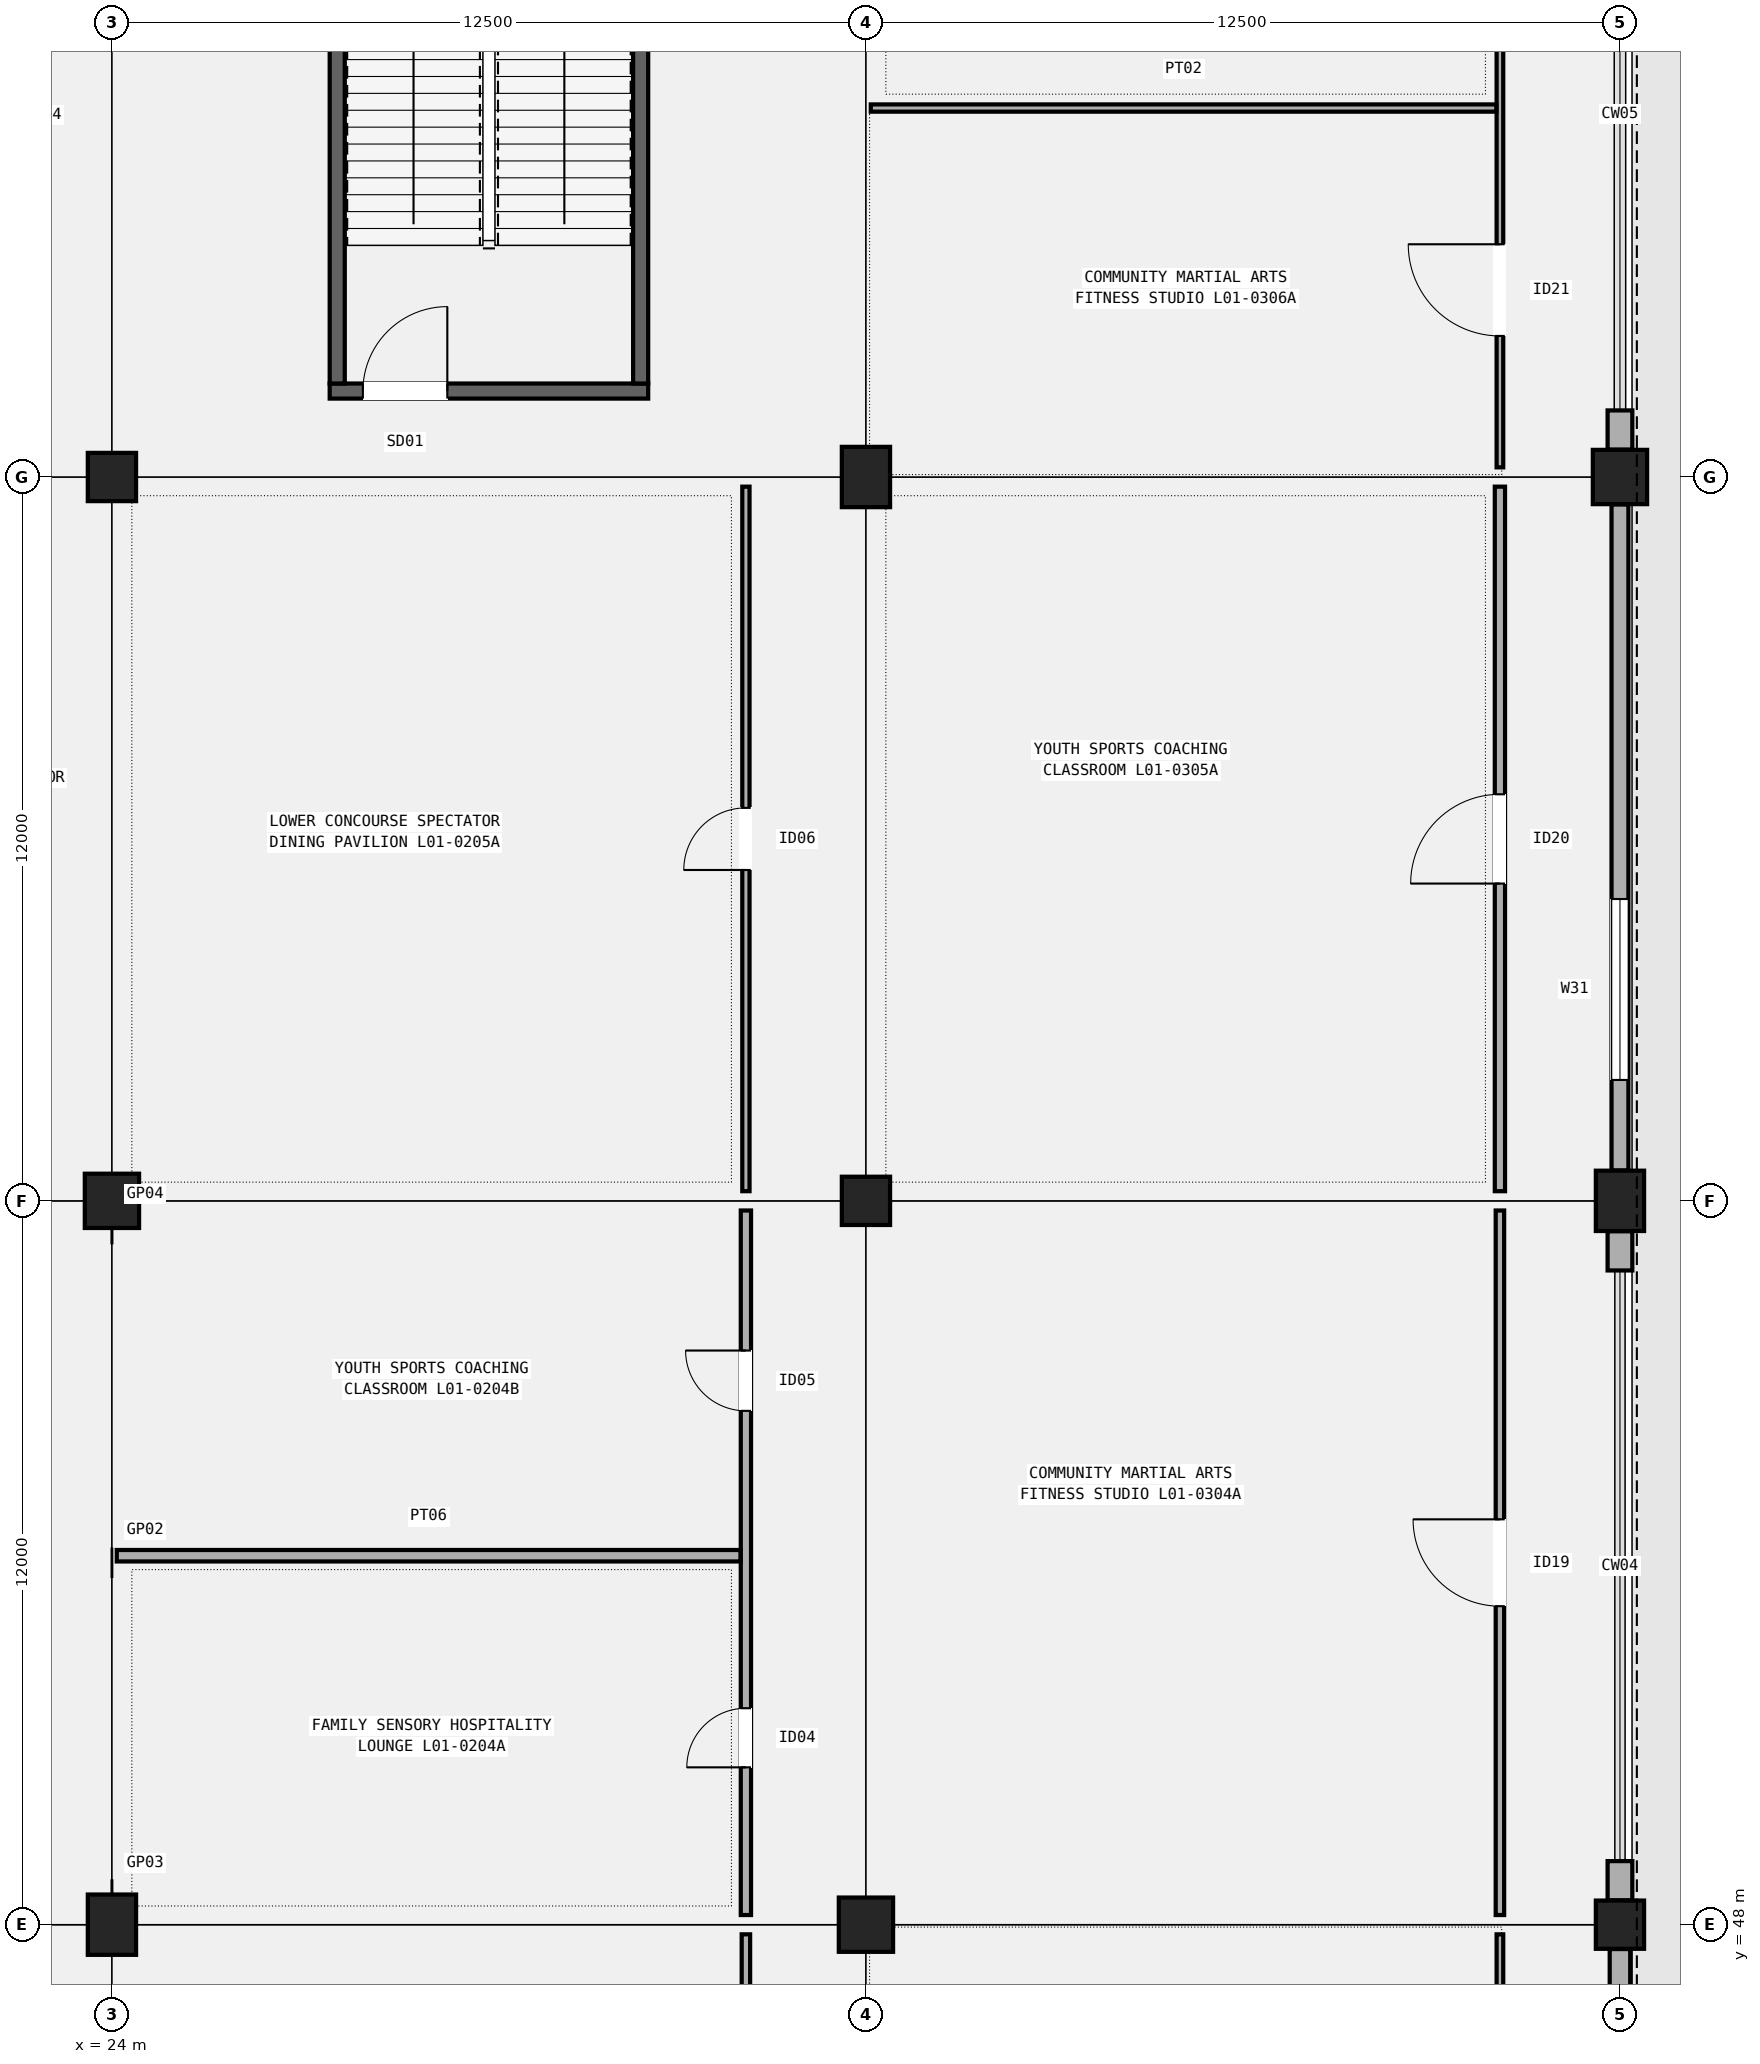
"""IFC4 building model, lengths in metres.
Left out: names, types, materials, properties, quantities, classifications, styles, units other than length and angle.
Written with IfcOpenShell. Run it as: python <this file> out.ifc"""

import sys

from ifc_helpers import new_model, si_unit, direction, frame, frame_2d, origin, origin_2d, place, context, subcontext, project, spatial, rectangle, extrude, element, fill, save


model = new_model("IFC4")
c1 = context("Model", 3, precision=1e-05, world=origin(), true_north=direction((0.0, 1.0)))
c2 = subcontext(c1, "Body", "Model", "MODEL_VIEW")
j1 = project(units=[si_unit("LENGTHUNIT", "METRE"), si_unit("PLANEANGLEUNIT", "RADIAN")], contexts=[c1])
p1 = place(None, origin())
s1 = spatial("IfcSite", under=j1, at=p1, CompositionType="ELEMENT")
p2 = place(p1, origin())
s2 = spatial("IfcBuilding", under=s1, at=p2, CompositionType="ELEMENT")
p3 = place(p2, frame((0.0, 0.0, 5.4)))
s3 = spatial("IfcBuildingStorey", under=s2, at=p3, CompositionType="ELEMENT", Elevation=5.4)
p4 = place(p3, frame((24.0, 48.0, 0.0), z_axis=(0.0, 0.0, 1.0), x_axis=(1.0, 0.0, 0.0)))
e1 = element("IfcColumn", 1, at=p4, inside=s3, PredefinedType="COLUMN", context=c2, shape_type="SweptSolid", body=[
    extrude(rectangle(XDim=0.8, YDim=1.0, at=origin_2d()), origin(), (0.0, 0.0, 1.0), 4.8),
])
p5 = place(p3, frame((24.0, 60.0, 0.0), z_axis=(0.0, 0.0, 1.0), x_axis=(1.0, 0.0, 0.0)))
e2 = element("IfcColumn", 2, at=p5, inside=s3, PredefinedType="COLUMN", context=c2, shape_type="SweptSolid", body=[
    extrude(rectangle(XDim=0.9, YDim=0.9, at=origin_2d()), origin(), (0.0, 0.0, 1.0), 4.8),
])
p6 = place(p3, frame((24.0, 72.0, 0.0), z_axis=(0.0, 0.0, 1.0), x_axis=(1.0, 0.0, 0.0)))
e3 = element("IfcColumn", 3, at=p6, inside=s3, PredefinedType="COLUMN", context=c2, shape_type="SweptSolid", body=[
    extrude(rectangle(XDim=0.8, YDim=0.8, at=origin_2d()), origin(), (0.0, 0.0, 1.0), 4.8),
])
p7 = place(p3, frame((36.5, 48.0, 0.0), z_axis=(0.0, 0.0, 1.0), x_axis=(1.0, 0.0, 0.0)))
e4 = element("IfcColumn", 4, at=p7, inside=s3, PredefinedType="COLUMN", context=c2, shape_type="SweptSolid", body=[
    extrude(rectangle(XDim=0.9, YDim=0.9, at=origin_2d()), origin(), (0.0, 0.0, 1.0), 4.8),
])
p8 = place(p3, frame((36.5, 60.0, 0.0), z_axis=(0.0, 0.0, 1.0), x_axis=(1.0, 0.0, 0.0)))
e5 = element("IfcColumn", 5, at=p8, inside=s3, PredefinedType="COLUMN", context=c2, shape_type="SweptSolid", body=[
    extrude(rectangle(XDim=0.8, YDim=0.8, at=origin_2d()), origin(), (0.0, 0.0, 1.0), 4.8),
])
p9 = place(p3, frame((36.5, 72.0, 0.0), z_axis=(0.0, 0.0, 1.0), x_axis=(1.0, 0.0, 0.0)))
e6 = element("IfcColumn", 6, at=p9, inside=s3, PredefinedType="COLUMN", context=c2, shape_type="SweptSolid", body=[
    extrude(rectangle(XDim=0.8, YDim=1.0, at=origin_2d()), origin(), (0.0, 0.0, 1.0), 4.8),
])
p10 = place(p3, frame((49.0, 48.0, 0.0), z_axis=(0.0, 0.0, 1.0), x_axis=(1.0, 0.0, 0.0)))
e7 = element("IfcColumn", 7, at=p10, inside=s3, PredefinedType="COLUMN", context=c2, shape_type="SweptSolid", body=[
    extrude(rectangle(XDim=0.8, YDim=0.8, at=origin_2d()), origin(), (0.0, 0.0, 1.0), 4.8),
])
p11 = place(p3, frame((49.0, 60.0, 0.0), z_axis=(0.0, 0.0, 1.0), x_axis=(1.0, 0.0, 0.0)))
e8 = element("IfcColumn", 8, at=p11, inside=s3, PredefinedType="COLUMN", context=c2, shape_type="SweptSolid", body=[
    extrude(rectangle(XDim=0.8, YDim=1.0, at=origin_2d()), origin(), (0.0, 0.0, 1.0), 4.8),
])
p12 = place(p3, frame((49.0, 72.0, 0.0), z_axis=(0.0, 0.0, 1.0), x_axis=(1.0, 0.0, 0.0)))
e9 = element("IfcColumn", 9, at=p12, inside=s3, PredefinedType="COLUMN", context=c2, shape_type="SweptSolid", body=[
    extrude(rectangle(XDim=0.9, YDim=0.9, at=origin_2d()), origin(), (0.0, 0.0, 1.0), 4.8),
])
p13 = place(p3, frame((49.0, 36.454, 0.0), z_axis=(0.0, 0.0, 1.0), x_axis=(0.0, 1.0, 0.0)))
e10 = element("IfcWall", 10, at=p13, inside=s3, PredefinedType="SOLIDWALL", context=c2, shape_type="SweptSolid", body=[
    extrude(rectangle(XDim=11.142, YDim=0.34, at=frame_2d((5.571, 0.0))), origin(), (0.0, 0.0, 1.0), 4.2),
])
p14 = place(p13, frame((1.5, 0.0, 0.95)))
e11 = element("IfcOpeningElement", 11, at=p14, cuts=e10, PredefinedType="OPENING", context=c2, shape_type="SweptSolid", body=[
    extrude(rectangle(XDim=3.0, YDim=1.7, at=frame_2d((1.5, 0.85))), frame((0.0, 0.18, 0.0), z_axis=(0.0, -1.0, 0.0), x_axis=(1.0, 0.0, 0.0)), (0.0, 0.0, 1.0), 0.36),
])
p15 = place(p3, frame((49.0, 48.404, 0.0), z_axis=(0.0, 0.0, 1.0), x_axis=(0.0, 1.0, 0.0)))
e12 = element("IfcWall", 12, at=p15, inside=s3, PredefinedType="SOLIDWALL", context=c2, shape_type="SweptSolid", body=[
    extrude(rectangle(XDim=0.65, YDim=0.41, at=frame_2d((0.325, 0.0))), origin(), (0.0, 0.0, 1.0), 4.15),
])
p16 = place(p3, frame((49.0, 58.846, 0.0), z_axis=(0.0, 0.0, 1.0), x_axis=(0.0, 1.0, 0.0)))
e13 = element("IfcWall", 13, at=p16, inside=s3, PredefinedType="SOLIDWALL", context=c2, shape_type="SweptSolid", body=[
    extrude(rectangle(XDim=0.65, YDim=0.41, at=frame_2d((0.325, 0.0))), origin(), (0.0, 0.0, 1.0), 4.15),
])
p17 = place(p3, frame((49.0, 60.504, 0.0), z_axis=(0.0, 0.0, 1.0), x_axis=(0.0, 1.0, 0.0)))
e14 = element("IfcWall", 14, at=p17, inside=s3, PredefinedType="SOLIDWALL", context=c2, shape_type="SweptSolid", body=[
    extrude(rectangle(XDim=11.042, YDim=0.28, at=frame_2d((5.521, 0.0))), origin(), (0.0, 0.0, 1.0), 4.2),
])
p18 = place(p17, frame((1.5, 0.0, 0.95)))
e15 = element("IfcOpeningElement", 15, at=p18, cuts=e14, PredefinedType="OPENING", context=c2, shape_type="SweptSolid", body=[
    extrude(rectangle(XDim=3.0, YDim=2.15, at=frame_2d((1.5, 1.075))), frame((0.0, 0.15, 0.0), z_axis=(0.0, -1.0, 0.0), x_axis=(1.0, 0.0, 0.0)), (0.0, 0.0, 1.0), 0.3),
])
p19 = place(p3, frame((49.0, 72.454, 0.0), z_axis=(0.0, 0.0, 1.0), x_axis=(0.0, 1.0, 0.0)))
e16 = element("IfcWall", 16, at=p19, inside=s3, PredefinedType="SOLIDWALL", context=c2, shape_type="SweptSolid", body=[
    extrude(rectangle(XDim=0.65, YDim=0.41, at=frame_2d((0.325, 0.0))), origin(), (0.0, 0.0, 1.0), 4.15),
])
p20 = place(p3, frame((27.61, 73.425, 0.0), z_axis=(0.0, 0.0, 1.0), x_axis=(1.0, 0.0, 0.0)))
e17 = element("IfcWall", 17, at=p20, inside=s3, PredefinedType="SHEAR", context=c2, shape_type="SweptSolid", body=[
    extrude(rectangle(XDim=5.28, YDim=0.25, at=frame_2d((2.64, 0.0))), origin(), (0.0, 0.0, 1.0), 4.55),
])
p21 = place(p20, frame((0.55, 0.0, 0.0)))
e18 = element("IfcOpeningElement", 18, at=p21, cuts=e17, PredefinedType="OPENING", context=c2, shape_type="SweptSolid", body=[
    extrude(rectangle(XDim=1.4, YDim=2.15, at=frame_2d((0.7, 1.075))), frame((0.0, 0.135, 0.0), z_axis=(0.0, -1.0, 0.0), x_axis=(1.0, 0.0, 0.0)), (0.0, 0.0, 1.0), 0.27),
])
for number, where, z_axis, x_axis in (
    (19, (27.735, 73.55, 0.0), (0.0, 0.0, 1.0), (0.0, 1.0, 0.0)),
    (20, (32.765, 73.55, 0.0), (0.0, 0.0, 1.0), (0.0, 1.0, 0.0)),
):
    element("IfcWall", number, at=place(p3, frame(where, z_axis=z_axis, x_axis=x_axis)), inside=s3, PredefinedType="SHEAR", context=c2, shape_type="SweptSolid", body=[
        extrude(rectangle(XDim=8.9, YDim=0.25, at=frame_2d((4.45, 0.0))), origin(), (0.0, 0.0, 1.0), 4.55),
    ])
p22 = place(p3, frame((34.51, 37.92, 0.0), z_axis=(0.0, 0.0, 1.0), x_axis=(0.0, 1.0, 0.0)))
e21 = element("IfcWall", 21, at=p22, inside=s3, PredefinedType="PARTITIONING", context=c2, shape_type="SweptSolid", body=[
    extrude(rectangle(XDim=9.92, YDim=0.14, at=frame_2d((4.96, 0.0))), origin(), (0.0, 0.0, 1.0), 3.92),
])
p23 = place(p22, frame((4.485, 0.0, 0.0)))
e22 = element("IfcOpeningElement", 22, at=p23, cuts=e21, PredefinedType="OPENING", context=c2, shape_type="SweptSolid", body=[
    extrude(rectangle(XDim=0.95, YDim=2.12, at=frame_2d((0.475, 1.06))), frame((0.0, 0.08, 0.0), z_axis=(0.0, -1.0, 0.0), x_axis=(1.0, 0.0, 0.0)), (0.0, 0.0, 1.0), 0.16),
])
p24 = place(p3, frame((34.51, 48.16, 0.0), z_axis=(0.0, 0.0, 1.0), x_axis=(0.0, 1.0, 0.0)))
e23 = element("IfcWall", 23, at=p24, inside=s3, PredefinedType="PARTITIONING", context=c2, shape_type="SweptSolid", body=[
    extrude(rectangle(XDim=11.68, YDim=0.17, at=frame_2d((5.84, 0.0))), origin(), (0.0, 0.0, 1.0), 3.92),
])
p25 = place(p24, frame((2.448, 0.0, 0.0)))
e24 = element("IfcOpeningElement", 24, at=p25, cuts=e23, PredefinedType="OPENING", context=c2, shape_type="SweptSolid", body=[
    extrude(rectangle(XDim=0.98, YDim=2.1, at=frame_2d((0.49, 1.05))), frame((0.0, 0.095, 0.0), z_axis=(0.0, -1.0, 0.0), x_axis=(1.0, 0.0, 0.0)), (0.0, 0.0, 1.0), 0.19),
])
p26 = place(p24, frame((8.358, 0.0, 0.0)))
e25 = element("IfcOpeningElement", 25, at=p26, cuts=e23, PredefinedType="OPENING", context=c2, shape_type="SweptSolid", body=[
    extrude(rectangle(XDim=1.0, YDim=2.14, at=frame_2d((0.5, 1.07))), frame((0.0, 0.095, 0.0), z_axis=(0.0, -1.0, 0.0), x_axis=(1.0, 0.0, 0.0)), (0.0, 0.0, 1.0), 0.19),
])
p27 = place(p3, frame((24.08, 54.117, 0.0), z_axis=(0.0, 0.0, 1.0), x_axis=(1.0, 0.0, 0.0)))
e26 = element("IfcWall", 26, at=p27, inside=s3, PredefinedType="PARTITIONING", context=c2, shape_type="SweptSolid", body=[
    extrude(rectangle(XDim=10.34, YDim=0.19, at=frame_2d((5.17, 0.0))), origin(), (0.0, 0.0, 1.0), 3.92),
])
p28 = place(p3, frame((34.51, 60.16, 0.0), z_axis=(0.0, 0.0, 1.0), x_axis=(0.0, 1.0, 0.0)))
e27 = element("IfcWall", 27, at=p28, inside=s3, PredefinedType="PARTITIONING", context=c2, shape_type="SweptSolid", body=[
    extrude(rectangle(XDim=11.68, YDim=0.12, at=frame_2d((5.84, 0.0))), origin(), (0.0, 0.0, 1.0), 3.92),
])
p29 = place(p28, frame((5.325, 0.0, 0.0)))
e28 = element("IfcOpeningElement", 28, at=p29, cuts=e27, PredefinedType="OPENING", context=c2, shape_type="SweptSolid", body=[
    extrude(rectangle(XDim=1.03, YDim=2.12, at=frame_2d((0.515, 1.06))), frame((0.0, 0.07, 0.0), z_axis=(0.0, -1.0, 0.0), x_axis=(1.0, 0.0, 0.0)), (0.0, 0.0, 1.0), 0.14),
])
p30 = place(p3, frame((47.01, 37.92, 0.0), z_axis=(0.0, 0.0, 1.0), x_axis=(0.0, 1.0, 0.0)))
e29 = element("IfcWall", 29, at=p30, inside=s3, PredefinedType="PARTITIONING", context=c2, shape_type="SweptSolid", body=[
    extrude(rectangle(XDim=9.92, YDim=0.11, at=frame_2d((4.96, 0.0))), origin(), (0.0, 0.0, 1.0), 3.92),
])
p31 = place(p30, frame((4.26, 0.0, 0.0)))
e30 = element("IfcOpeningElement", 30, at=p31, cuts=e29, PredefinedType="OPENING", context=c2, shape_type="SweptSolid", body=[
    extrude(rectangle(XDim=1.4, YDim=2.24, at=frame_2d((0.7, 1.12))), frame((0.0, 0.065, 0.0), z_axis=(0.0, -1.0, 0.0), x_axis=(1.0, 0.0, 0.0)), (0.0, 0.0, 1.0), 0.13),
])
p32 = place(p3, frame((47.01, 48.16, 0.0), z_axis=(0.0, 0.0, 1.0), x_axis=(0.0, 1.0, 0.0)))
e31 = element("IfcWall", 31, at=p32, inside=s3, PredefinedType="PARTITIONING", context=c2, shape_type="SweptSolid", body=[
    extrude(rectangle(XDim=11.68, YDim=0.14, at=frame_2d((5.84, 0.0))), origin(), (0.0, 0.0, 1.0), 3.92),
])
p33 = place(p32, frame((5.12, 0.0, 0.0)))
e32 = element("IfcOpeningElement", 32, at=p33, cuts=e31, PredefinedType="OPENING", context=c2, shape_type="SweptSolid", body=[
    extrude(rectangle(XDim=1.44, YDim=2.26, at=frame_2d((0.72, 1.13))), frame((0.0, 0.08, 0.0), z_axis=(0.0, -1.0, 0.0), x_axis=(1.0, 0.0, 0.0)), (0.0, 0.0, 1.0), 0.16),
])
p34 = place(p3, frame((47.01, 60.16, 0.0), z_axis=(0.0, 0.0, 1.0), x_axis=(0.0, 1.0, 0.0)))
e33 = element("IfcWall", 33, at=p34, inside=s3, PredefinedType="PARTITIONING", context=c2, shape_type="SweptSolid", body=[
    extrude(rectangle(XDim=11.68, YDim=0.17, at=frame_2d((5.84, 0.0))), origin(), (0.0, 0.0, 1.0), 3.92),
])
p35 = place(p34, frame((5.1, 0.0, 0.0)))
e34 = element("IfcOpeningElement", 34, at=p35, cuts=e33, PredefinedType="OPENING", context=c2, shape_type="SweptSolid", body=[
    extrude(rectangle(XDim=1.48, YDim=2.24, at=frame_2d((0.74, 1.12))), frame((0.0, 0.095, 0.0), z_axis=(0.0, -1.0, 0.0), x_axis=(1.0, 0.0, 0.0)), (0.0, 0.0, 1.0), 0.19),
])
p36 = place(p3, frame((47.01, 72.16, 0.0), z_axis=(0.0, 0.0, 1.0), x_axis=(0.0, 1.0, 0.0)))
e35 = element("IfcWall", 35, at=p36, inside=s3, PredefinedType="PARTITIONING", context=c2, shape_type="SweptSolid", body=[
    extrude(rectangle(XDim=11.68, YDim=0.11, at=frame_2d((5.84, 0.0))), origin(), (0.0, 0.0, 1.0), 3.92),
])
p37 = place(p36, frame((2.178, 0.0, 0.0)))
e36 = element("IfcOpeningElement", 36, at=p37, cuts=e35, PredefinedType="OPENING", context=c2, shape_type="SweptSolid", body=[
    extrude(rectangle(XDim=1.52, YDim=2.28, at=frame_2d((0.76, 1.14))), frame((0.0, 0.065, 0.0), z_axis=(0.0, -1.0, 0.0), x_axis=(1.0, 0.0, 0.0)), (0.0, 0.0, 1.0), 0.13),
])
p38 = place(p36, frame((8.078, 0.0, 0.0)))
e37 = element("IfcOpeningElement", 37, at=p38, cuts=e35, PredefinedType="OPENING", context=c2, shape_type="SweptSolid", body=[
    extrude(rectangle(XDim=1.56, YDim=2.26, at=frame_2d((0.78, 1.13))), frame((0.0, 0.065, 0.0), z_axis=(0.0, -1.0, 0.0), x_axis=(1.0, 0.0, 0.0)), (0.0, 0.0, 1.0), 0.13),
])
p39 = place(p3, frame((36.58, 78.117, 0.0), z_axis=(0.0, 0.0, 1.0), x_axis=(1.0, 0.0, 0.0)))
e38 = element("IfcWall", 38, at=p39, inside=s3, PredefinedType="PARTITIONING", context=c2, shape_type="SweptSolid", body=[
    extrude(rectangle(XDim=10.37, YDim=0.12, at=frame_2d((5.185, 0.0))), origin(), (0.0, 0.0, 1.0), 3.92),
])
p40 = place(p18, origin())
e39 = element("IfcWindow", 39, at=p40, inside=s3, PartitioningType="SINGLE_PANEL", PredefinedType="WINDOW", context=c2, shape_type="SweptSolid", body=[
    extrude(rectangle(XDim=3.0, YDim=2.15, at=frame_2d((1.5, 1.075))), frame((0.0, 0.03, 0.0), z_axis=(0.0, -1.0, 0.0), x_axis=(1.0, 0.0, 0.0)), (0.0, 0.0, 1.0), 0.06),
])
fill(e15, e39)
p41 = place(p21, origin())
e40 = element("IfcDoor", 40, at=p41, inside=s3, OperationType="SINGLE_SWING_RIGHT", PredefinedType="DOOR", context=c2, shape_type="SweptSolid", body=[
    extrude(rectangle(XDim=1.4, YDim=2.15, at=frame_2d((0.7, 1.075))), frame((0.0, 0.025, 0.0), z_axis=(0.0, -1.0, 0.0), x_axis=(1.0, 0.0, 0.0)), (0.0, 0.0, 1.0), 0.05),
])
fill(e18, e40)
p42 = place(p25, origin())
e41 = element("IfcDoor", 41, at=p42, inside=s3, OperationType="SINGLE_SWING_LEFT", PredefinedType="DOOR", context=c2, shape_type="SweptSolid", body=[
    extrude(rectangle(XDim=0.98, YDim=2.1, at=frame_2d((0.49, 1.05))), frame((0.0, 0.025, 0.0), z_axis=(0.0, -1.0, 0.0), x_axis=(1.0, 0.0, 0.0)), (0.0, 0.0, 1.0), 0.05),
])
fill(e24, e41)
p43 = place(p26, origin())
e42 = element("IfcDoor", 42, at=p43, inside=s3, OperationType="SINGLE_SWING_RIGHT", PredefinedType="DOOR", context=c2, shape_type="SweptSolid", body=[
    extrude(rectangle(XDim=1.0, YDim=2.14, at=frame_2d((0.5, 1.07))), frame((0.0, 0.025, 0.0), z_axis=(0.0, -1.0, 0.0), x_axis=(1.0, 0.0, 0.0)), (0.0, 0.0, 1.0), 0.05),
])
fill(e25, e42)
p44 = place(p29, origin())
e43 = element("IfcDoor", 43, at=p44, inside=s3, OperationType="SINGLE_SWING_LEFT", PredefinedType="DOOR", context=c2, shape_type="SweptSolid", body=[
    extrude(rectangle(XDim=1.03, YDim=2.12, at=frame_2d((0.515, 1.06))), frame((0.0, 0.025, 0.0), z_axis=(0.0, -1.0, 0.0), x_axis=(1.0, 0.0, 0.0)), (0.0, 0.0, 1.0), 0.05),
])
fill(e28, e43)
p45 = place(p33, origin())
e44 = element("IfcDoor", 44, at=p45, inside=s3, OperationType="SINGLE_SWING_RIGHT", PredefinedType="DOOR", context=c2, shape_type="SweptSolid", body=[
    extrude(rectangle(XDim=1.44, YDim=2.26, at=frame_2d((0.72, 1.13))), frame((0.0, 0.025, 0.0), z_axis=(0.0, -1.0, 0.0), x_axis=(1.0, 0.0, 0.0)), (0.0, 0.0, 1.0), 0.05),
])
fill(e32, e44)
p46 = place(p35, origin())
e45 = element("IfcDoor", 45, at=p46, inside=s3, OperationType="SINGLE_SWING_LEFT", PredefinedType="DOOR", context=c2, shape_type="SweptSolid", body=[
    extrude(rectangle(XDim=1.48, YDim=2.24, at=frame_2d((0.74, 1.12))), frame((0.0, 0.025, 0.0), z_axis=(0.0, -1.0, 0.0), x_axis=(1.0, 0.0, 0.0)), (0.0, 0.0, 1.0), 0.05),
])
fill(e34, e45)
p47 = place(p37, origin())
e46 = element("IfcDoor", 46, at=p47, inside=s3, OperationType="SINGLE_SWING_RIGHT", PredefinedType="DOOR", context=c2, shape_type="SweptSolid", body=[
    extrude(rectangle(XDim=1.52, YDim=2.28, at=frame_2d((0.76, 1.14))), frame((0.0, 0.025, 0.0), z_axis=(0.0, -1.0, 0.0), x_axis=(1.0, 0.0, 0.0)), (0.0, 0.0, 1.0), 0.05),
])
fill(e36, e46)
save(model, sys.argv[1])
